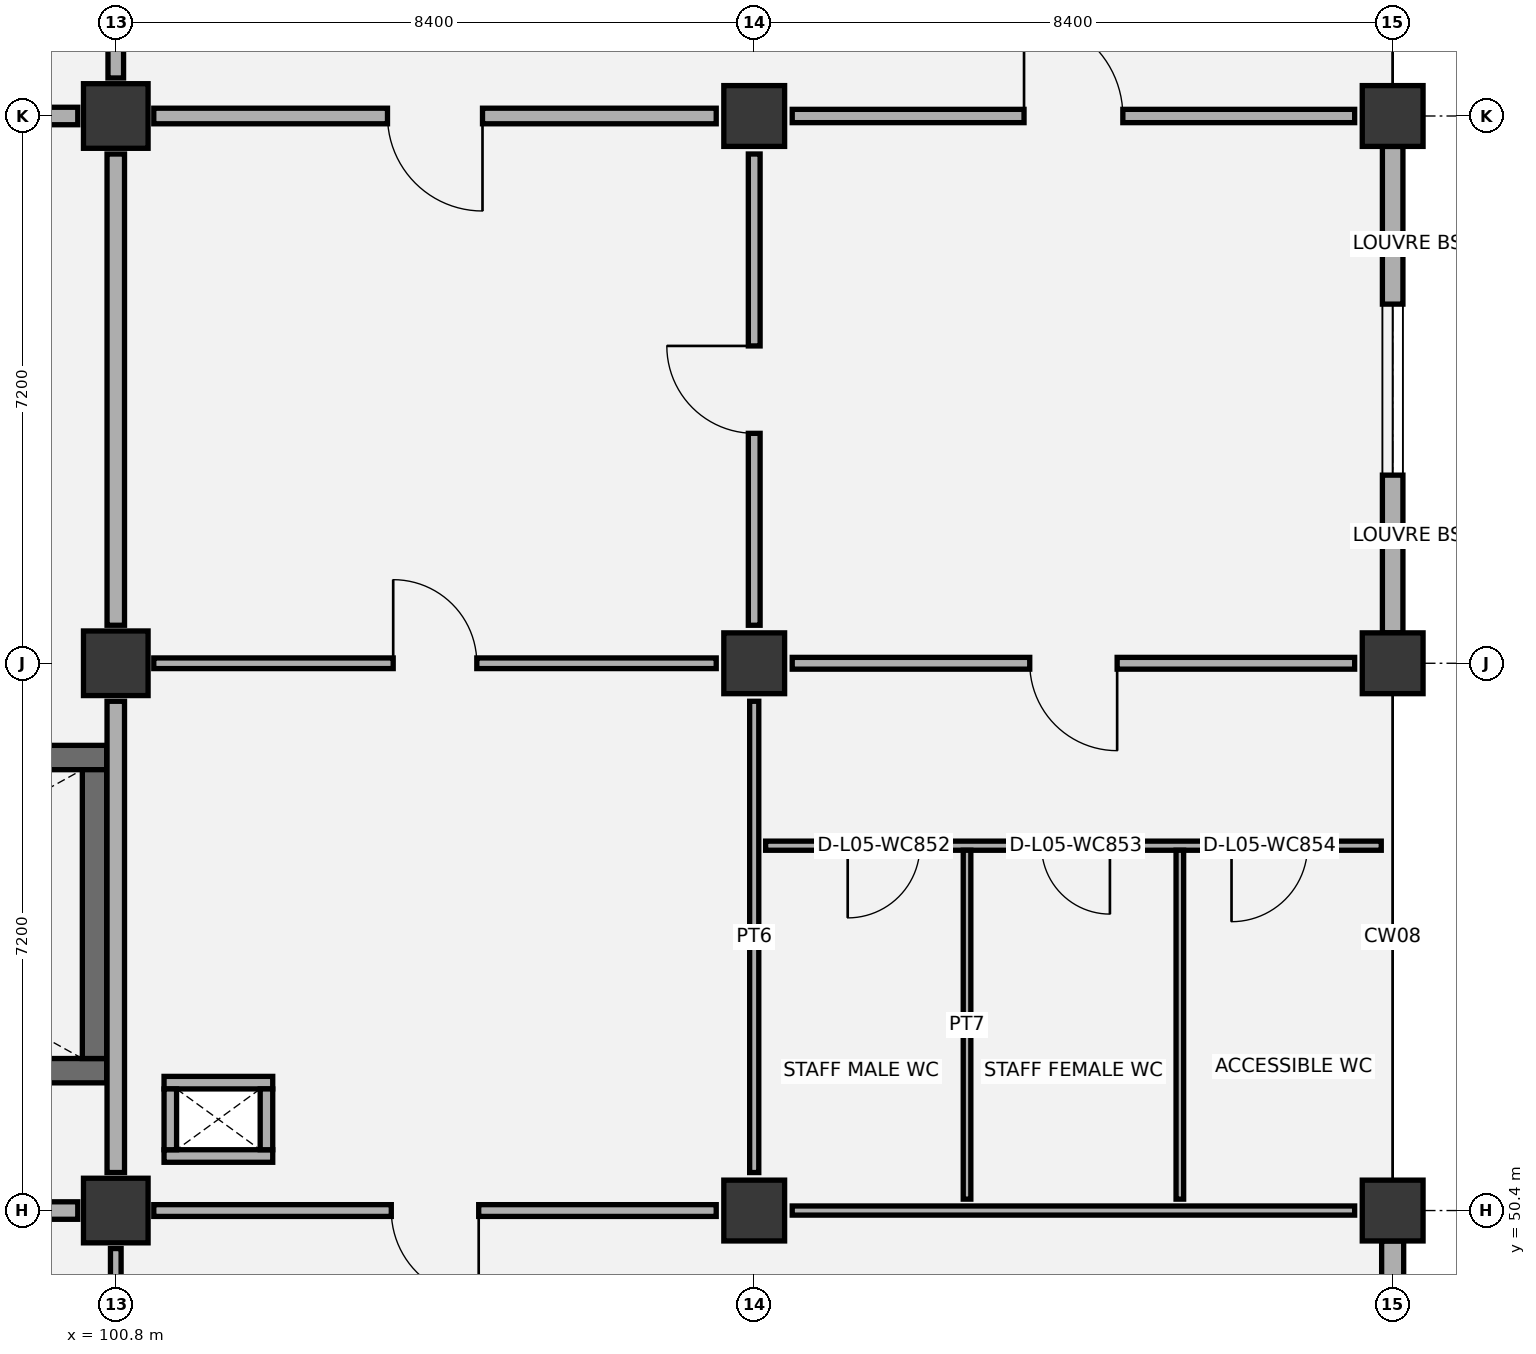
"""IFC4 building model, lengths in metres.
Left out: names, types, materials, properties, quantities, classifications, styles, units other than length and angle.
Written with IfcOpenShell. Run it as: python <this file> out.ifc"""

import sys

from ifc_helpers import new_model, si_unit, direction, frame, frame_2d, origin, origin_2d, place, context, subcontext, project, spatial, rectangle, extrude, element, fill, save


model = new_model("IFC4")
c1 = context("Model", 3, precision=1e-05, world=origin(), true_north=direction((0.0, 1.0)))
c2 = subcontext(c1, "Body", "Model", "MODEL_VIEW")
j1 = project(units=[si_unit("LENGTHUNIT", "METRE"), si_unit("PLANEANGLEUNIT", "RADIAN")], contexts=[c1])
p1 = place(None, origin())
s1 = spatial("IfcSite", under=j1, at=p1, CompositionType="ELEMENT")
p2 = place(p1, origin())
s2 = spatial("IfcBuilding", under=s1, at=p2, CompositionType="ELEMENT")
p3 = place(p2, frame((0.0, 0.0, 27.0)))
s3 = spatial("IfcBuildingStorey", under=s2, at=p3, CompositionType="ELEMENT", Elevation=27.0)
for number, where, z_axis, x_axis in (
    (1, (100.8, 50.4, 0.0), (0.0, 0.0, 1.0), (1.0, 0.0, 0.0)),
    (2, (100.8, 57.6, 0.0), (0.0, 0.0, 1.0), (1.0, 0.0, 0.0)),
    (3, (100.8, 64.8, 0.0), (0.0, 0.0, 1.0), (1.0, 0.0, 0.0)),
):
    element("IfcColumn", number, at=place(p3, frame(where, z_axis=z_axis, x_axis=x_axis)), inside=s3, PredefinedType="COLUMN", context=c2, shape_type="SweptSolid", body=[
        extrude(rectangle(XDim=0.85, YDim=0.85, at=origin_2d()), origin(), (0.0, 0.0, 1.0), 4.2),
    ])
for number, where, z_axis, x_axis in (
    (4, (109.2, 50.4, 0.0), (0.0, 0.0, 1.0), (1.0, 0.0, 0.0)),
    (5, (109.2, 57.6, 0.0), (0.0, 0.0, 1.0), (1.0, 0.0, 0.0)),
    (6, (109.2, 64.8, 0.0), (0.0, 0.0, 1.0), (1.0, 0.0, 0.0)),
    (7, (117.6, 50.4, 0.0), (0.0, 0.0, 1.0), (1.0, 0.0, 0.0)),
    (8, (117.6, 57.6, 0.0), (0.0, 0.0, 1.0), (1.0, 0.0, 0.0)),
    (9, (117.6, 64.8, 0.0), (0.0, 0.0, 1.0), (1.0, 0.0, 0.0)),
):
    element("IfcColumn", number, at=place(p3, frame(where, z_axis=z_axis, x_axis=x_axis)), inside=s3, PredefinedType="COLUMN", context=c2, shape_type="SweptSolid", body=[
        extrude(rectangle(XDim=0.8, YDim=0.8, at=origin_2d()), origin(), (0.0, 0.0, 1.0), 4.2),
    ])
p4 = place(p3, frame((93.2, 52.24, 0.0), z_axis=(0.0, 0.0, 1.0), x_axis=(1.0, 0.0, 0.0)))
e10 = element("IfcWall", 10, at=p4, inside=s3, PredefinedType="SHEAR", context=c2, shape_type="SweptSolid", body=[
    extrude(rectangle(XDim=7.48, YDim=0.32, at=frame_2d((3.74, 0.0))), origin(), (0.0, 0.0, 1.0), 3.92),
])
p5 = place(p4, frame((0.45, 0.0, 0.0)))
e11 = element("IfcOpeningElement", 11, at=p5, cuts=e10, PredefinedType="OPENING", context=c2, shape_type="SweptSolid", body=[
    extrude(rectangle(XDim=1.05, YDim=2.15, at=frame_2d((0.525, 1.075))), frame((0.0, 0.17, 0.0), z_axis=(0.0, -1.0, 0.0), x_axis=(1.0, 0.0, 0.0)), (0.0, 0.0, 1.0), 0.34),
])
p6 = place(p3, frame((93.2, 56.36, 0.0), z_axis=(0.0, 0.0, 1.0), x_axis=(1.0, 0.0, 0.0)))
e12 = element("IfcWall", 12, at=p6, inside=s3, PredefinedType="SHEAR", context=c2, shape_type="SweptSolid", body=[
    extrude(rectangle(XDim=7.48, YDim=0.32, at=frame_2d((3.74, 0.0))), origin(), (0.0, 0.0, 1.0), 3.92),
])
p7 = place(p3, frame((100.52, 52.4, 0.0), z_axis=(0.0, 0.0, 1.0), x_axis=(0.0, 1.0, 0.0)))
e13 = element("IfcWall", 13, at=p7, inside=s3, PredefinedType="SHEAR", context=c2, shape_type="SweptSolid", body=[
    extrude(rectangle(XDim=3.8, YDim=0.32, at=frame_2d((1.9, 0.0))), origin(), (0.0, 0.0, 1.0), 3.92),
])
p8 = place(p3, frame((117.6, 43.6, 0.0), z_axis=(0.0, 0.0, 1.0), x_axis=(0.0, 1.0, 0.0)))
e14 = element("IfcWall", 14, at=p8, inside=s3, PredefinedType="SOLIDWALL", context=c2, shape_type="SweptSolid", body=[
    extrude(rectangle(XDim=6.4, YDim=0.29, at=frame_2d((3.2, 0.0))), origin(), (0.0, 0.0, 1.0), 3.365),
])
p9 = place(p8, frame((1.333, 0.0, 0.9)))
e15 = element("IfcOpeningElement", 15, at=p9, cuts=e14, PredefinedType="OPENING", context=c2, shape_type="SweptSolid", body=[
    extrude(rectangle(XDim=1.2, YDim=1.8, at=frame_2d((0.6, 0.9))), frame((0.0, 0.155, 0.0), z_axis=(0.0, -1.0, 0.0), x_axis=(1.0, 0.0, 0.0)), (0.0, 0.0, 1.0), 0.31),
])
p10 = place(p8, frame((3.867, 0.0, 0.9)))
e16 = element("IfcOpeningElement", 16, at=p10, cuts=e14, PredefinedType="OPENING", context=c2, shape_type="SweptSolid", body=[
    extrude(rectangle(XDim=1.2, YDim=1.8, at=frame_2d((0.6, 0.9))), frame((0.0, 0.155, 0.0), z_axis=(0.0, -1.0, 0.0), x_axis=(1.0, 0.0, 0.0)), (0.0, 0.0, 1.0), 0.31),
])
p11 = place(p3, frame((117.6, 58.0, 0.0), z_axis=(0.0, 0.0, 1.0), x_axis=(0.0, 1.0, 0.0)))
e17 = element("IfcWall", 17, at=p11, inside=s3, PredefinedType="SOLIDWALL", context=c2, shape_type="SweptSolid", body=[
    extrude(rectangle(XDim=6.4, YDim=0.27, at=frame_2d((3.2, 0.0))), origin(), (0.0, 0.0, 1.0), 3.365),
])
p12 = place(p11, frame((2.075, 0.0, 0.9)))
e18 = element("IfcOpeningElement", 18, at=p12, cuts=e17, PredefinedType="OPENING", context=c2, shape_type="SweptSolid", body=[
    extrude(rectangle(XDim=2.25, YDim=1.95, at=frame_2d((1.125, 0.975))), frame((0.0, 0.145, 0.0), z_axis=(0.0, -1.0, 0.0), x_axis=(1.0, 0.0, 0.0)), (0.0, 0.0, 1.0), 0.29),
])
for number, where, z_axis, x_axis in (
    (19, (101.435, 51.117, 0.0), (0.0, 0.0, 1.0), (1.0, 0.0, 0.0)),
    (20, (101.435, 52.083, 0.0), (0.0, 0.0, 1.0), (1.0, 0.0, 0.0)),
):
    element("IfcWall", number, at=place(p3, frame(where, z_axis=z_axis, x_axis=x_axis)), inside=s3, PredefinedType="PARTITIONING", context=c2, shape_type="SweptSolid", body=[
        extrude(rectangle(XDim=1.43, YDim=0.165, at=frame_2d((0.715, 0.0))), origin(), (0.0, 0.0, 1.0), 3.92),
    ])
for number, where, z_axis, x_axis in (
    (21, (101.518, 51.2, 0.0), (0.0, 0.0, 1.0), (0.0, 1.0, 0.0)),
    (22, (102.782, 51.2, 0.0), (0.0, 0.0, 1.0), (0.0, 1.0, 0.0)),
):
    element("IfcWall", number, at=place(p3, frame(where, z_axis=z_axis, x_axis=x_axis)), inside=s3, PredefinedType="PARTITIONING", context=c2, shape_type="SweptSolid", body=[
        extrude(rectangle(XDim=0.8, YDim=0.165, at=frame_2d((0.4, 0.0))), origin(), (0.0, 0.0, 1.0), 3.92),
    ])
p13 = place(p3, frame((109.35, 55.2, 0.0), z_axis=(0.0, 0.0, 1.0), x_axis=(1.0, 0.0, 0.0)))
e23 = element("IfcWall", 23, at=p13, inside=s3, PredefinedType="PARTITIONING", context=c2, shape_type="SweptSolid", body=[
    extrude(rectangle(XDim=8.1, YDim=0.12, at=frame_2d((4.05, 0.0))), origin(), (0.0, 0.0, 1.0), 3.92),
])
p14 = place(p13, frame((1.08, 0.0, 0.0)))
e24 = element("IfcOpeningElement", 24, at=p14, cuts=e23, PredefinedType="OPENING", context=c2, shape_type="SweptSolid", body=[
    extrude(rectangle(XDim=0.95, YDim=2.1, at=frame_2d((0.475, 1.05))), frame((0.0, 0.07, 0.0), z_axis=(0.0, -1.0, 0.0), x_axis=(1.0, 0.0, 0.0)), (0.0, 0.0, 1.0), 0.14),
])
p15 = place(p13, frame((3.63, 0.0, 0.0)))
e25 = element("IfcOpeningElement", 25, at=p15, cuts=e23, PredefinedType="OPENING", context=c2, shape_type="SweptSolid", body=[
    extrude(rectangle(XDim=0.9, YDim=2.1, at=frame_2d((0.45, 1.05))), frame((0.0, 0.07, 0.0), z_axis=(0.0, -1.0, 0.0), x_axis=(1.0, 0.0, 0.0)), (0.0, 0.0, 1.0), 0.14),
])
p16 = place(p13, frame((6.13, 0.0, 0.0)))
e26 = element("IfcOpeningElement", 26, at=p16, cuts=e23, PredefinedType="OPENING", context=c2, shape_type="SweptSolid", body=[
    extrude(rectangle(XDim=1.0, YDim=2.1, at=frame_2d((0.5, 1.05))), frame((0.0, 0.07, 0.0), z_axis=(0.0, -1.0, 0.0), x_axis=(1.0, 0.0, 0.0)), (0.0, 0.0, 1.0), 0.14),
])
for number, where, z_axis, x_axis in (
    (27, (112.0, 50.55, 0.0), (0.0, 0.0, 1.0), (0.0, 1.0, 0.0)),
    (28, (114.8, 50.55, 0.0), (0.0, 0.0, 1.0), (0.0, 1.0, 0.0)),
):
    element("IfcWall", number, at=place(p3, frame(where, z_axis=z_axis, x_axis=x_axis)), inside=s3, PredefinedType="PARTITIONING", context=c2, shape_type="SweptSolid", body=[
        extrude(rectangle(XDim=4.59, YDim=0.1, at=frame_2d((2.295, 0.0))), origin(), (0.0, 0.0, 1.0), 3.92),
    ])
p17 = place(p3, frame((100.8, 43.7, 0.0), z_axis=(0.0, 0.0, 1.0), x_axis=(0.0, 1.0, 0.0)))
e29 = element("IfcWall", 29, at=p17, inside=s3, PredefinedType="PARTITIONING", context=c2, shape_type="SweptSolid", body=[
    extrude(rectangle(XDim=6.2, YDim=0.14, at=frame_2d((3.1, 0.0))), origin(), (0.0, 0.0, 1.0), 3.265),
])
p18 = place(p17, frame((2.55, 0.0, 0.0)))
e30 = element("IfcOpeningElement", 30, at=p18, cuts=e29, PredefinedType="OPENING", context=c2, shape_type="SweptSolid", body=[
    extrude(rectangle(XDim=1.1, YDim=2.1, at=frame_2d((0.55, 1.05))), frame((0.0, 0.08, 0.0), z_axis=(0.0, -1.0, 0.0), x_axis=(1.0, 0.0, 0.0)), (0.0, 0.0, 1.0), 0.16),
])
p19 = place(p3, frame((92.9, 50.4, 0.0), z_axis=(0.0, 0.0, 1.0), x_axis=(1.0, 0.0, 0.0)))
e31 = element("IfcWall", 31, at=p19, inside=s3, PredefinedType="PARTITIONING", context=c2, shape_type="SweptSolid", body=[
    extrude(rectangle(XDim=7.4, YDim=0.23, at=frame_2d((3.7, 0.0))), origin(), (0.0, 0.0, 1.0), 3.565),
])
p20 = place(p19, frame((2.95, 0.0, 0.0)))
e32 = element("IfcOpeningElement", 32, at=p20, cuts=e31, PredefinedType="OPENING", context=c2, shape_type="SweptSolid", body=[
    extrude(rectangle(XDim=1.5, YDim=2.15, at=frame_2d((0.75, 1.075))), frame((0.0, 0.125, 0.0), z_axis=(0.0, -1.0, 0.0), x_axis=(1.0, 0.0, 0.0)), (0.0, 0.0, 1.0), 0.25),
])
p21 = place(p3, frame((100.8, 50.9, 0.0), z_axis=(0.0, 0.0, 1.0), x_axis=(0.0, 1.0, 0.0)))
e33 = element("IfcWall", 33, at=p21, inside=s3, PredefinedType="PARTITIONING", context=c2, shape_type="SweptSolid", body=[
    extrude(rectangle(XDim=6.2, YDim=0.23, at=frame_2d((3.1, 0.0))), origin(), (0.0, 0.0, 1.0), 3.515),
])
p22 = place(p3, frame((100.8, 58.1, 0.0), z_axis=(0.0, 0.0, 1.0), x_axis=(0.0, 1.0, 0.0)))
e34 = element("IfcWall", 34, at=p22, inside=s3, PredefinedType="PARTITIONING", context=c2, shape_type="SweptSolid", body=[
    extrude(rectangle(XDim=6.2, YDim=0.23, at=frame_2d((3.1, 0.0))), origin(), (0.0, 0.0, 1.0), 3.265),
])
p23 = place(p3, frame((92.9, 64.8, 0.0), z_axis=(0.0, 0.0, 1.0), x_axis=(1.0, 0.0, 0.0)))
e35 = element("IfcWall", 35, at=p23, inside=s3, PredefinedType="PARTITIONING", context=c2, shape_type="SweptSolid", body=[
    extrude(rectangle(XDim=7.4, YDim=0.23, at=frame_2d((3.7, 0.0))), origin(), (0.0, 0.0, 1.0), 3.565),
])
p24 = place(p3, frame((100.8, 65.3, 0.0), z_axis=(0.0, 0.0, 1.0), x_axis=(0.0, 1.0, 0.0)))
e36 = element("IfcWall", 36, at=p24, inside=s3, PredefinedType="PARTITIONING", context=c2, shape_type="SweptSolid", body=[
    extrude(rectangle(XDim=6.2, YDim=0.205, at=frame_2d((3.1, 0.0))), origin(), (0.0, 0.0, 1.0), 3.625),
])
p25 = place(p24, frame((2.35, 0.0, 0.0)))
e37 = element("IfcOpeningElement", 37, at=p25, cuts=e36, PredefinedType="OPENING", context=c2, shape_type="SweptSolid", body=[
    extrude(rectangle(XDim=1.5, YDim=2.2, at=frame_2d((0.75, 1.1))), frame((0.0, 0.113, 0.0), z_axis=(0.0, -1.0, 0.0), x_axis=(1.0, 0.0, 0.0)), (0.0, 0.0, 1.0), 0.225),
])
p26 = place(p3, frame((101.3, 50.4, 0.0), z_axis=(0.0, 0.0, 1.0), x_axis=(1.0, 0.0, 0.0)))
e38 = element("IfcWall", 38, at=p26, inside=s3, PredefinedType="PARTITIONING", context=c2, shape_type="SweptSolid", body=[
    extrude(rectangle(XDim=7.4, YDim=0.155, at=frame_2d((3.7, 0.0))), origin(), (0.0, 0.0, 1.0), 3.625),
])
p27 = place(p26, frame((3.125, 0.0, 0.0)))
e39 = element("IfcOpeningElement", 39, at=p27, cuts=e38, PredefinedType="OPENING", context=c2, shape_type="SweptSolid", body=[
    extrude(rectangle(XDim=1.15, YDim=2.1, at=frame_2d((0.575, 1.05))), frame((0.0, 0.087, 0.0), z_axis=(0.0, -1.0, 0.0), x_axis=(1.0, 0.0, 0.0)), (0.0, 0.0, 1.0), 0.175),
])
p28 = place(p3, frame((109.2, 50.9, 0.0), z_axis=(0.0, 0.0, 1.0), x_axis=(0.0, 1.0, 0.0)))
e40 = element("IfcWall", 40, at=p28, inside=s3, PredefinedType="PARTITIONING", context=c2, shape_type="SweptSolid", body=[
    extrude(rectangle(XDim=6.2, YDim=0.12, at=frame_2d((3.1, 0.0))), origin(), (0.0, 0.0, 1.0), 3.265),
])
p29 = place(p3, frame((101.3, 57.6, 0.0), z_axis=(0.0, 0.0, 1.0), x_axis=(1.0, 0.0, 0.0)))
e41 = element("IfcWall", 41, at=p29, inside=s3, PredefinedType="PARTITIONING", context=c2, shape_type="SweptSolid", body=[
    extrude(rectangle(XDim=7.4, YDim=0.14, at=frame_2d((3.7, 0.0))), origin(), (0.0, 0.0, 1.0), 3.625),
])
p30 = place(p29, frame((3.15, 0.0, 0.0)))
e42 = element("IfcOpeningElement", 42, at=p30, cuts=e41, PredefinedType="OPENING", context=c2, shape_type="SweptSolid", body=[
    extrude(rectangle(XDim=1.1, YDim=2.1, at=frame_2d((0.55, 1.05))), frame((0.0, 0.08, 0.0), z_axis=(0.0, -1.0, 0.0), x_axis=(1.0, 0.0, 0.0)), (0.0, 0.0, 1.0), 0.16),
])
p31 = place(p3, frame((109.2, 58.1, 0.0), z_axis=(0.0, 0.0, 1.0), x_axis=(0.0, 1.0, 0.0)))
e43 = element("IfcWall", 43, at=p31, inside=s3, PredefinedType="PARTITIONING", context=c2, shape_type="SweptSolid", body=[
    extrude(rectangle(XDim=6.2, YDim=0.155, at=frame_2d((3.1, 0.0))), origin(), (0.0, 0.0, 1.0), 3.625),
])
p32 = place(p31, frame((2.525, 0.0, 0.0)))
e44 = element("IfcOpeningElement", 44, at=p32, cuts=e43, PredefinedType="OPENING", context=c2, shape_type="SweptSolid", body=[
    extrude(rectangle(XDim=1.15, YDim=2.1, at=frame_2d((0.575, 1.05))), frame((0.0, 0.087, 0.0), z_axis=(0.0, -1.0, 0.0), x_axis=(1.0, 0.0, 0.0)), (0.0, 0.0, 1.0), 0.175),
])
p33 = place(p3, frame((101.3, 64.8, 0.0), z_axis=(0.0, 0.0, 1.0), x_axis=(1.0, 0.0, 0.0)))
e45 = element("IfcWall", 45, at=p33, inside=s3, PredefinedType="PARTITIONING", context=c2, shape_type="SweptSolid", body=[
    extrude(rectangle(XDim=7.4, YDim=0.205, at=frame_2d((3.7, 0.0))), origin(), (0.0, 0.0, 1.0), 3.625),
])
p34 = place(p33, frame((3.075, 0.0, 0.0)))
e46 = element("IfcOpeningElement", 46, at=p34, cuts=e45, PredefinedType="OPENING", context=c2, shape_type="SweptSolid", body=[
    extrude(rectangle(XDim=1.25, YDim=2.1, at=frame_2d((0.625, 1.05))), frame((0.0, 0.113, 0.0), z_axis=(0.0, -1.0, 0.0), x_axis=(1.0, 0.0, 0.0)), (0.0, 0.0, 1.0), 0.225),
])
p35 = place(p3, frame((109.7, 50.4, 0.0), z_axis=(0.0, 0.0, 1.0), x_axis=(1.0, 0.0, 0.0)))
e47 = element("IfcWall", 47, at=p35, inside=s3, PredefinedType="PARTITIONING", context=c2, shape_type="SweptSolid", body=[
    extrude(rectangle(XDim=7.4, YDim=0.12, at=frame_2d((3.7, 0.0))), origin(), (0.0, 0.0, 1.0), 3.215),
])
p36 = place(p3, frame((109.7, 57.6, 0.0), z_axis=(0.0, 0.0, 1.0), x_axis=(1.0, 0.0, 0.0)))
e48 = element("IfcWall", 48, at=p36, inside=s3, PredefinedType="PARTITIONING", context=c2, shape_type="SweptSolid", body=[
    extrude(rectangle(XDim=7.4, YDim=0.155, at=frame_2d((3.7, 0.0))), origin(), (0.0, 0.0, 1.0), 3.215),
])
p37 = place(p36, frame((3.125, 0.0, 0.0)))
e49 = element("IfcOpeningElement", 49, at=p37, cuts=e48, PredefinedType="OPENING", context=c2, shape_type="SweptSolid", body=[
    extrude(rectangle(XDim=1.15, YDim=2.1, at=frame_2d((0.575, 1.05))), frame((0.0, 0.087, 0.0), z_axis=(0.0, -1.0, 0.0), x_axis=(1.0, 0.0, 0.0)), (0.0, 0.0, 1.0), 0.175),
])
p38 = place(p3, frame((109.7, 64.8, 0.0), z_axis=(0.0, 0.0, 1.0), x_axis=(1.0, 0.0, 0.0)))
e50 = element("IfcWall", 50, at=p38, inside=s3, PredefinedType="PARTITIONING", context=c2, shape_type="SweptSolid", body=[
    extrude(rectangle(XDim=7.4, YDim=0.175, at=frame_2d((3.7, 0.0))), origin(), (0.0, 0.0, 1.0), 3.215),
])
p39 = place(p38, frame((3.05, 0.0, 0.0)))
e51 = element("IfcOpeningElement", 51, at=p39, cuts=e50, PredefinedType="OPENING", context=c2, shape_type="SweptSolid", body=[
    extrude(rectangle(XDim=1.3, YDim=2.15, at=frame_2d((0.65, 1.075))), frame((0.0, 0.097, 0.0), z_axis=(0.0, -1.0, 0.0), x_axis=(1.0, 0.0, 0.0)), (0.0, 0.0, 1.0), 0.195),
])
p40 = place(p12, origin())
e52 = element("IfcWindow", 52, at=p40, inside=s3, PartitioningType="SINGLE_PANEL", PredefinedType="WINDOW", context=c2, shape_type="SweptSolid", body=[
    extrude(rectangle(XDim=2.25, YDim=1.95, at=frame_2d((1.125, 0.975))), frame((0.0, 0.03, 0.0), z_axis=(0.0, -1.0, 0.0), x_axis=(1.0, 0.0, 0.0)), (0.0, 0.0, 1.0), 0.06),
])
fill(e18, e52)
p41 = place(p14, frame((0.95, 0.0, 0.0), z_axis=(0.0, 0.0, 1.0), x_axis=(-1.0, 0.0, 0.0)))
e53 = element("IfcDoor", 53, at=p41, inside=s3, OperationType="SINGLE_SWING_RIGHT", PredefinedType="DOOR", context=c2, shape_type="SweptSolid", body=[
    extrude(rectangle(XDim=0.95, YDim=2.1, at=frame_2d((0.475, 1.05))), frame((0.0, 0.025, 0.0), z_axis=(0.0, -1.0, 0.0), x_axis=(1.0, 0.0, 0.0)), (0.0, 0.0, 1.0), 0.05),
])
fill(e24, e53)
p42 = place(p15, frame((0.9, 0.0, 0.0), z_axis=(0.0, 0.0, 1.0), x_axis=(-1.0, 0.0, 0.0)))
e54 = element("IfcDoor", 54, at=p42, inside=s3, OperationType="SINGLE_SWING_LEFT", PredefinedType="DOOR", context=c2, shape_type="SweptSolid", body=[
    extrude(rectangle(XDim=0.9, YDim=2.1, at=frame_2d((0.45, 1.05))), frame((0.0, 0.025, 0.0), z_axis=(0.0, -1.0, 0.0), x_axis=(1.0, 0.0, 0.0)), (0.0, 0.0, 1.0), 0.05),
])
fill(e25, e54)
p43 = place(p16, frame((1.0, 0.0, 0.0), z_axis=(0.0, 0.0, 1.0), x_axis=(-1.0, 0.0, 0.0)))
e55 = element("IfcDoor", 55, at=p43, inside=s3, OperationType="SINGLE_SWING_RIGHT", PredefinedType="DOOR", context=c2, shape_type="SweptSolid", body=[
    extrude(rectangle(XDim=1.0, YDim=2.1, at=frame_2d((0.5, 1.05))), frame((0.0, 0.025, 0.0), z_axis=(0.0, -1.0, 0.0), x_axis=(1.0, 0.0, 0.0)), (0.0, 0.0, 1.0), 0.05),
])
fill(e26, e55)
p44 = place(p27, frame((1.15, 0.0, 0.0), z_axis=(0.0, 0.0, 1.0), x_axis=(-1.0, 0.0, 0.0)))
e56 = element("IfcDoor", 56, at=p44, inside=s3, OperationType="SINGLE_SWING_LEFT", PredefinedType="DOOR", context=c2, shape_type="SweptSolid", body=[
    extrude(rectangle(XDim=1.15, YDim=2.1, at=frame_2d((0.575, 1.05))), frame((0.0, 0.025, 0.0), z_axis=(0.0, -1.0, 0.0), x_axis=(1.0, 0.0, 0.0)), (0.0, 0.0, 1.0), 0.05),
])
fill(e39, e56)
p45 = place(p30, origin())
e57 = element("IfcDoor", 57, at=p45, inside=s3, OperationType="SINGLE_SWING_LEFT", PredefinedType="DOOR", context=c2, shape_type="SweptSolid", body=[
    extrude(rectangle(XDim=1.1, YDim=2.1, at=frame_2d((0.55, 1.05))), frame((0.0, 0.025, 0.0), z_axis=(0.0, -1.0, 0.0), x_axis=(1.0, 0.0, 0.0)), (0.0, 0.0, 1.0), 0.05),
])
fill(e42, e57)
p46 = place(p32, origin())
e58 = element("IfcDoor", 58, at=p46, inside=s3, OperationType="SINGLE_SWING_RIGHT", PredefinedType="DOOR", context=c2, shape_type="SweptSolid", body=[
    extrude(rectangle(XDim=1.15, YDim=2.1, at=frame_2d((0.575, 1.05))), frame((0.0, 0.025, 0.0), z_axis=(0.0, -1.0, 0.0), x_axis=(1.0, 0.0, 0.0)), (0.0, 0.0, 1.0), 0.05),
])
fill(e44, e58)
p47 = place(p34, frame((1.25, 0.0, 0.0), z_axis=(0.0, 0.0, 1.0), x_axis=(-1.0, 0.0, 0.0)))
e59 = element("IfcDoor", 59, at=p47, inside=s3, OperationType="SINGLE_SWING_LEFT", PredefinedType="DOOR", context=c2, shape_type="SweptSolid", body=[
    extrude(rectangle(XDim=1.25, YDim=2.1, at=frame_2d((0.625, 1.05))), frame((0.0, 0.025, 0.0), z_axis=(0.0, -1.0, 0.0), x_axis=(1.0, 0.0, 0.0)), (0.0, 0.0, 1.0), 0.05),
])
fill(e46, e59)
p48 = place(p37, frame((1.15, 0.0, 0.0), z_axis=(0.0, 0.0, 1.0), x_axis=(-1.0, 0.0, 0.0)))
e60 = element("IfcDoor", 60, at=p48, inside=s3, OperationType="SINGLE_SWING_LEFT", PredefinedType="DOOR", context=c2, shape_type="SweptSolid", body=[
    extrude(rectangle(XDim=1.15, YDim=2.1, at=frame_2d((0.575, 1.05))), frame((0.0, 0.025, 0.0), z_axis=(0.0, -1.0, 0.0), x_axis=(1.0, 0.0, 0.0)), (0.0, 0.0, 1.0), 0.05),
])
fill(e49, e60)
p49 = place(p39, origin())
e61 = element("IfcDoor", 61, at=p49, inside=s3, OperationType="SINGLE_SWING_LEFT", PredefinedType="DOOR", context=c2, shape_type="SweptSolid", body=[
    extrude(rectangle(XDim=1.3, YDim=2.15, at=frame_2d((0.65, 1.075))), frame((0.0, 0.025, 0.0), z_axis=(0.0, -1.0, 0.0), x_axis=(1.0, 0.0, 0.0)), (0.0, 0.0, 1.0), 0.05),
])
fill(e51, e61)
save(model, sys.argv[1])
